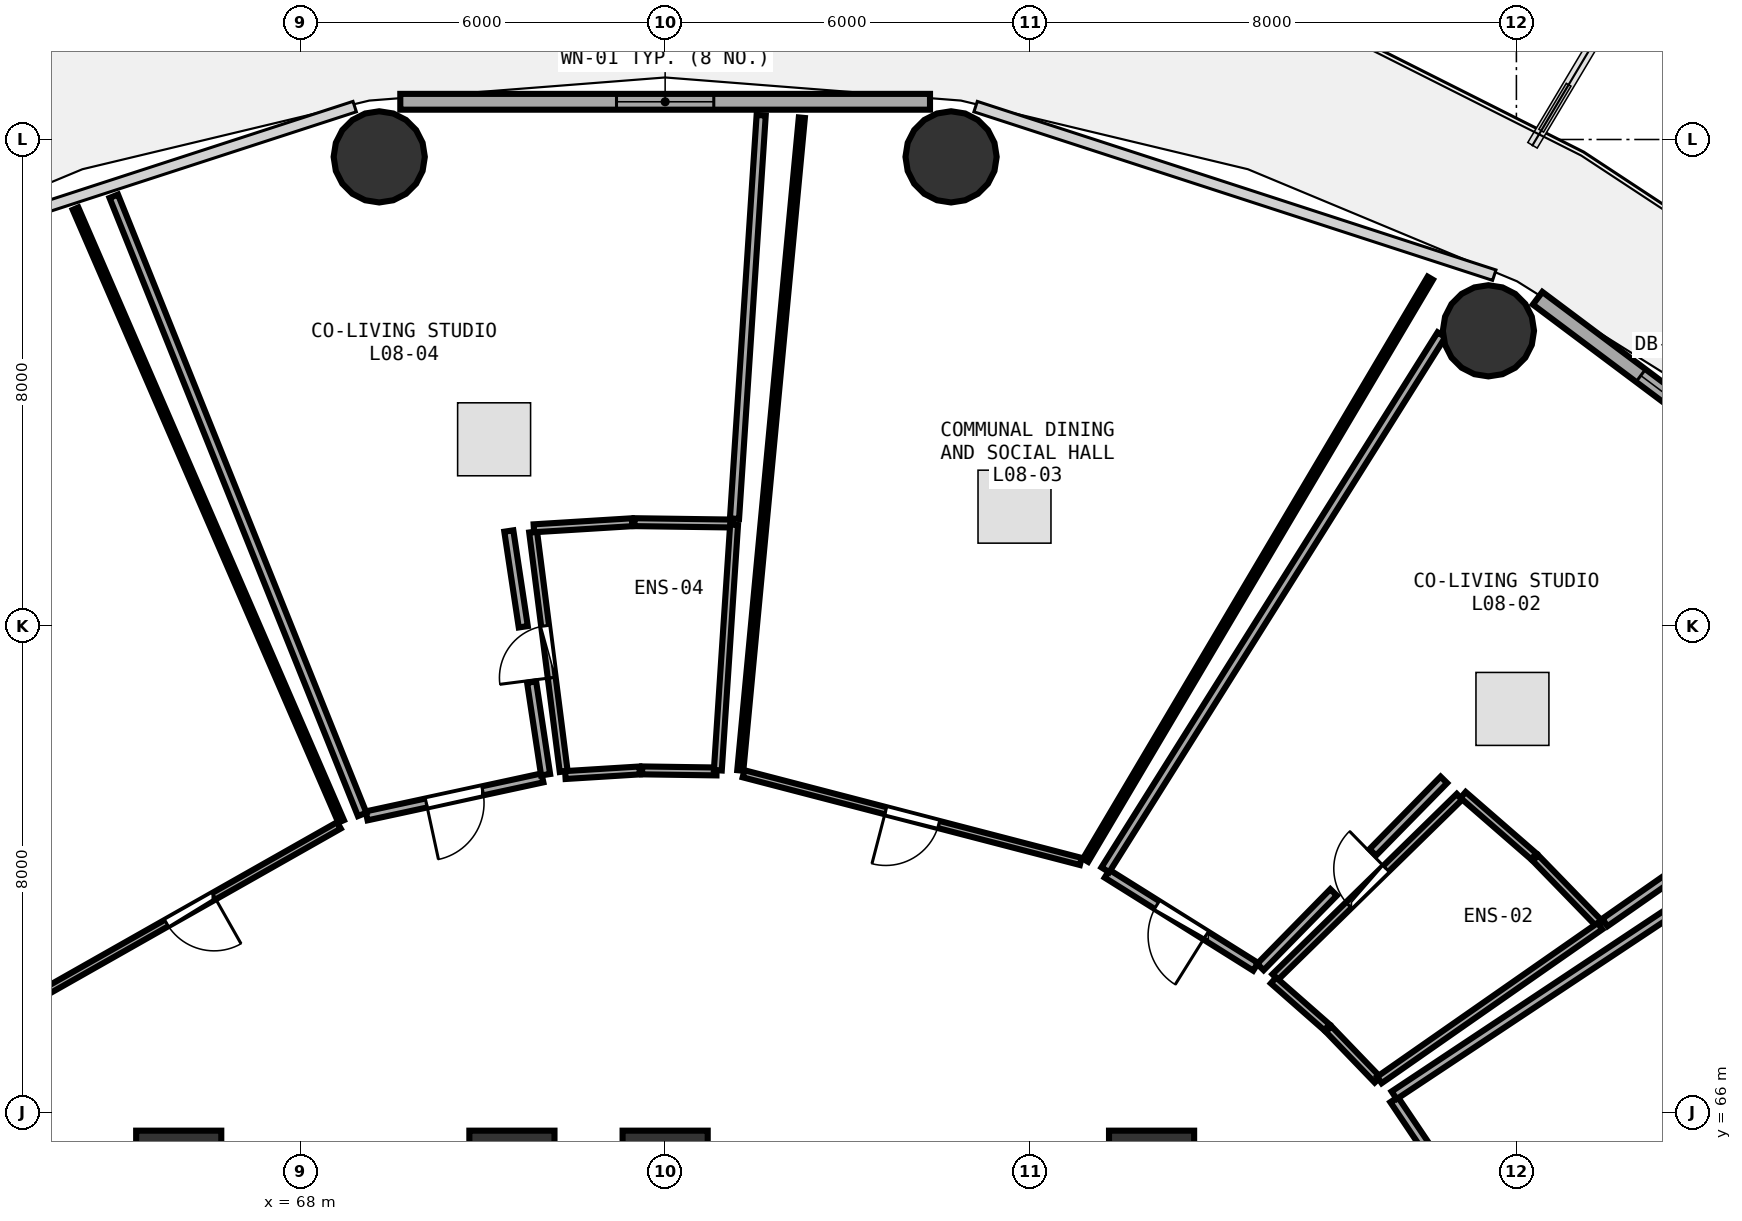
"""IFC4 building model, lengths in metres.
Left out: names, types, materials, properties, quantities, classifications, styles, units other than length and angle.
Written with IfcOpenShell. Run it as: python <this file> out.ifc"""

import sys

from ifc_helpers import new_model, si_unit, direction, frame, frame_2d, origin, origin_2d, place, context, subcontext, project, spatial, rectangle, circle, extrude, element, fill, save


model = new_model("IFC4")
c1 = context("Model", 3, precision=1e-05, world=origin(), true_north=direction((0.0, 1.0)))
c2 = subcontext(c1, "Body", "Model", "MODEL_VIEW")
j1 = project(units=[si_unit("LENGTHUNIT", "METRE"), si_unit("PLANEANGLEUNIT", "RADIAN")], contexts=[c1])
p1 = place(None, origin())
s1 = spatial("IfcSite", under=j1, at=p1, CompositionType="ELEMENT")
p2 = place(p1, origin())
s2 = spatial("IfcBuilding", under=s1, at=p2, CompositionType="ELEMENT")
p3 = place(p2, frame((0.0, 0.0, 33.75)))
s3 = spatial("IfcBuildingStorey", under=s2, at=p3, CompositionType="ELEMENT", Elevation=33.75)
for number, where, z_axis, x_axis in (
    (1, (82.0, 65.0, 0.0), (0.0, 0.0, 1.0), (1.0, 0.0, 0.0)),
    (2, (74.0, 65.0, 0.0), (0.0, 0.0, 1.0), (1.0, 0.0, 0.0)),
    (3, (71.48, 65.0, 0.0), (0.0, 0.0, 1.0), (1.0, 0.0, 0.0)),
    (4, (66.0, 65.0, 0.0), (0.0, 0.0, 1.0), (1.0, 0.0, 0.0)),
):
    element("IfcColumn", number, at=place(p3, frame(where, z_axis=z_axis, x_axis=x_axis)), inside=s3, PredefinedType="PILASTER", context=c2, shape_type="SweptSolid", body=[
        extrude(rectangle(XDim=1.4, YDim=1.4, at=origin_2d()), origin(), (0.0, 0.0, 1.0), 3.75),
    ])
for number, where, z_axis, x_axis in (
    (5, (87.54, 78.854, 0.0), (0.0, 0.0, 1.0), (1.0, 0.0, 0.0)),
    (6, (78.702, 81.714, 0.0), (0.0, 0.0, 1.0), (1.0, 0.0, 0.0)),
    (7, (69.298, 81.714, 0.0), (0.0, 0.0, 1.0), (1.0, 0.0, 0.0)),
):
    element("IfcColumn", number, at=place(p3, frame(where, z_axis=z_axis, x_axis=x_axis)), inside=s3, PredefinedType="COLUMN", context=c2, shape_type="SweptSolid", body=[
        extrude(circle(Radius=0.75, at=origin_2d()), origin(), (0.0, 0.0, 1.0), 3.75),
    ])
p4 = place(p3, frame((94.984, 74.418, 0.0), z_axis=(0.0, 0.0, 1.0), x_axis=(-0.80030733173, 0.599590005569, 0.0)))
e8 = element("IfcWall", 8, at=p4, inside=s3, PredefinedType="SOLIDWALL", context=c2, shape_type="SweptSolid", body=[
    extrude(rectangle(XDim=8.291, YDim=0.26, at=frame_2d((4.145, 0.0))), origin(), (0.0, 0.0, 1.0), 3.475),
])
p5 = place(p4, frame((3.67, 0.0, 0.0)))
e9 = element("IfcOpeningElement", 9, at=p5, cuts=e8, PredefinedType="OPENING", context=c2, shape_type="SweptSolid", body=[
    extrude(rectangle(XDim=0.95, YDim=2.1, at=frame_2d((0.475, 1.05))), frame((0.0, 0.14, 0.0), z_axis=(0.0, -1.0, 0.0), x_axis=(1.0, 0.0, 0.0)), (0.0, 0.0, 1.0), 0.28),
])
p6 = place(p4, frame((4.97, 0.0, 0.85)))
e10 = element("IfcOpeningElement", 10, at=p6, cuts=e8, PredefinedType="OPENING", context=c2, shape_type="SweptSolid", body=[
    extrude(rectangle(XDim=1.2, YDim=1.45, at=frame_2d((0.6, 0.725))), frame((0.0, 0.14, 0.0), z_axis=(0.0, -1.0, 0.0), x_axis=(1.0, 0.0, 0.0)), (0.0, 0.0, 1.0), 0.28),
])
p7 = place(p3, frame((78.356, 82.62, 0.0), z_axis=(0.0, 0.0, 1.0), x_axis=(-1.0, 0.0, 0.0)))
e11 = element("IfcWall", 11, at=p7, inside=s3, PredefinedType="SOLIDWALL", context=c2, shape_type="SweptSolid", body=[
    extrude(rectangle(XDim=8.712, YDim=0.26, at=frame_2d((4.356, 0.0))), origin(), (0.0, 0.0, 1.0), 3.475),
])
p8 = place(p7, frame((3.556, 0.0, 0.85)))
e12 = element("IfcOpeningElement", 12, at=p8, cuts=e11, PredefinedType="OPENING", context=c2, shape_type="SweptSolid", body=[
    extrude(rectangle(XDim=1.6, YDim=1.45, at=frame_2d((0.8, 0.725))), frame((0.0, 0.14, 0.0), z_axis=(0.0, -1.0, 0.0), x_axis=(1.0, 0.0, 0.0)), (0.0, 0.0, 1.0), 0.28),
])
p9 = place(p3, frame((87.533, 63.917, 0.0), z_axis=(0.0, 0.0, 1.0), x_axis=(-0.558444152287, 0.829542119953, 0.0)))
e13 = element("IfcWall", 13, at=p9, inside=s3, PredefinedType="PARTITIONING", context=c2, shape_type="SweptSolid", body=[
    extrude(rectangle(XDim=2.765, YDim=0.15, at=frame_2d((1.382, 0.0))), origin(), (0.0, 0.0, 1.0), 2.875),
])
p10 = place(p9, frame((0.907, 0.0, 0.0)))
e14 = element("IfcOpeningElement", 14, at=p10, cuts=e13, PredefinedType="OPENING", context=c2, shape_type="SweptSolid", body=[
    extrude(rectangle(XDim=0.95, YDim=2.08, at=frame_2d((0.475, 1.04))), frame((0.0, 0.085, 0.0), z_axis=(0.0, -1.0, 0.0), x_axis=(1.0, 0.0, 0.0)), (0.0, 0.0, 1.0), 0.17),
])
p11 = place(p3, frame((84.033, 68.226, 0.0), z_axis=(0.0, 0.0, 1.0), x_axis=(0.714891568972, 0.699235328493, 0.0)))
e15 = element("IfcWall", 15, at=p11, inside=s3, PredefinedType="PLUMBINGWALL", context=c2, shape_type="SweptSolid", body=[
    extrude(rectangle(XDim=4.241, YDim=0.13, at=frame_2d((2.121, 0.0))), origin(), (0.0, 0.0, 1.0), 3.235),
])
p12 = place(p11, frame((1.691, 0.0, 0.0)))
e16 = element("IfcOpeningElement", 16, at=p12, cuts=e15, PredefinedType="OPENING", context=c2, shape_type="SweptSolid", body=[
    extrude(rectangle(XDim=0.86, YDim=2.05, at=frame_2d((0.43, 1.025))), frame((0.0, 0.075, 0.0), z_axis=(0.0, -1.0, 0.0), x_axis=(1.0, 0.0, 0.0)), (0.0, 0.0, 1.0), 0.15),
])
p13 = place(p3, frame((83.711, 68.395, 0.0), z_axis=(0.0, 0.0, 1.0), x_axis=(-0.847522016495, 0.530760239238, 0.0)))
e17 = element("IfcWall", 17, at=p13, inside=s3, PredefinedType="PARTITIONING", context=c2, shape_type="SweptSolid", body=[
    extrude(rectangle(XDim=2.882, YDim=0.15, at=frame_2d((1.441, 0.0))), origin(), (0.0, 0.0, 1.0), 2.875),
])
p14 = place(p13, frame((0.966, 0.0, 0.0)))
e18 = element("IfcOpeningElement", 18, at=p14, cuts=e17, PredefinedType="OPENING", context=c2, shape_type="SweptSolid", body=[
    extrude(rectangle(XDim=0.95, YDim=2.08, at=frame_2d((0.475, 1.04))), frame((0.0, 0.085, 0.0), z_axis=(0.0, -1.0, 0.0), x_axis=(1.0, 0.0, 0.0)), (0.0, 0.0, 1.0), 0.17),
])
p15 = place(p3, frame((80.836, 70.127, 0.0), z_axis=(0.0, 0.0, 1.0), x_axis=(-0.967834541954, 0.251587558119, 0.0)))
e19 = element("IfcWall", 19, at=p15, inside=s3, PredefinedType="PARTITIONING", context=c2, shape_type="SweptSolid", body=[
    extrude(rectangle(XDim=5.73, YDim=0.12, at=frame_2d((2.865, 0.0))), origin(), (0.0, 0.0, 1.0), 2.875),
])
p16 = place(p15, frame((2.415, 0.0, 0.0)))
e20 = element("IfcOpeningElement", 20, at=p16, cuts=e19, PredefinedType="OPENING", context=c2, shape_type="SweptSolid", body=[
    extrude(rectangle(XDim=0.9, YDim=2.08, at=frame_2d((0.45, 1.04))), frame((0.0, 0.07, 0.0), z_axis=(0.0, -1.0, 0.0), x_axis=(1.0, 0.0, 0.0)), (0.0, 0.0, 1.0), 0.14),
])
p17 = place(p3, frame((72.331, 71.606, 0.0), z_axis=(0.0, 0.0, 1.0), x_axis=(-0.126591984802, 0.991954872655, 0.0)))
e21 = element("IfcWall", 21, at=p17, inside=s3, PredefinedType="PLUMBINGWALL", context=c2, shape_type="SweptSolid", body=[
    extrude(rectangle(XDim=3.971, YDim=0.13, at=frame_2d((1.985, 0.0))), origin(), (0.0, 0.0, 1.0), 3.175),
])
p18 = place(p17, frame((1.555, 0.0, 0.0)))
e22 = element("IfcOpeningElement", 22, at=p18, cuts=e21, PredefinedType="OPENING", context=c2, shape_type="SweptSolid", body=[
    extrude(rectangle(XDim=0.86, YDim=2.05, at=frame_2d((0.43, 1.025))), frame((0.0, 0.075, 0.0), z_axis=(0.0, -1.0, 0.0), x_axis=(1.0, 0.0, 0.0)), (0.0, 0.0, 1.0), 0.15),
])
p19 = place(p3, frame((71.981, 71.501, 0.0), z_axis=(0.0, 0.0, 1.0), x_axis=(-0.977451938751, -0.211158015313, 0.0)))
e23 = element("IfcWall", 23, at=p19, inside=s3, PredefinedType="PARTITIONING", context=c2, shape_type="SweptSolid", body=[
    extrude(rectangle(XDim=2.958, YDim=0.15, at=frame_2d((1.479, 0.0))), origin(), (0.0, 0.0, 1.0), 2.875),
])
p20 = place(p19, frame((1.004, 0.0, 0.0)))
e24 = element("IfcOpeningElement", 24, at=p20, cuts=e23, PredefinedType="OPENING", context=c2, shape_type="SweptSolid", body=[
    extrude(rectangle(XDim=0.95, YDim=2.08, at=frame_2d((0.475, 1.04))), frame((0.0, 0.085, 0.0), z_axis=(0.0, -1.0, 0.0), x_axis=(1.0, 0.0, 0.0)), (0.0, 0.0, 1.0), 0.17),
])
p21 = place(p3, frame((68.635, 70.72, 0.0), z_axis=(0.0, 0.0, 1.0), x_axis=(-0.870068136537, -0.49293147372, 0.0)))
e25 = element("IfcWall", 25, at=p21, inside=s3, PredefinedType="PARTITIONING", context=c2, shape_type="SweptSolid", body=[
    extrude(rectangle(XDim=5.621, YDim=0.12, at=frame_2d((2.811, 0.0))), origin(), (0.0, 0.0, 1.0), 2.875),
])
p22 = place(p21, frame((2.36, 0.0, 0.0)))
e26 = element("IfcOpeningElement", 26, at=p22, cuts=e25, PredefinedType="OPENING", context=c2, shape_type="SweptSolid", body=[
    extrude(rectangle(XDim=0.9, YDim=2.08, at=frame_2d((0.45, 1.04))), frame((0.0, 0.07, 0.0), z_axis=(0.0, -1.0, 0.0), x_axis=(1.0, 0.0, 0.0)), (0.0, 0.0, 1.0), 0.14),
])
p23 = place(p3, frame((85.989, 66.282, 0.0), z_axis=(0.0, 0.0, 1.0), x_axis=(0.833114362659, 0.553100767248, 0.0)))
e27 = element("IfcWall", 27, at=p23, inside=s3, PredefinedType="PARTITIONING", context=c2, shape_type="SweptSolid", body=[
    extrude(rectangle(XDim=11.808, YDim=0.15, at=frame_2d((5.904, 0.0))), origin(), (0.0, 0.0, 1.0), 2.875),
])
p24 = place(p3, frame((91.8, 65.626, 0.0), z_axis=(0.0, 0.0, 1.0), x_axis=(-0.92347379334, -0.383661508383, 0.0)))
e28 = element("IfcWall", 28, at=p24, inside=s3, PredefinedType="PARTITIONING", context=c2, shape_type="SweptSolid", body=[
    extrude(rectangle(XDim=1.8, YDim=0.15, at=frame_2d((0.9, 0.0))), origin(), (0.0, 0.0, 1.0), 2.875),
])
p25 = place(p3, frame((85.716, 66.536, 0.0), z_axis=(0.0, 0.0, 1.0), x_axis=(-0.693609314424, 0.720351385745, 0.0)))
e29 = element("IfcWall", 29, at=p25, inside=s3, PredefinedType="PLUMBINGWALL", context=c2, shape_type="SweptSolid", body=[
    extrude(rectangle(XDim=1.159, YDim=0.13, at=frame_2d((0.58, 0.0))), origin(), (0.0, 0.0, 1.0), 2.875),
])
p26 = place(p3, frame((84.883, 67.399, 0.0), z_axis=(0.0, 0.0, 1.0), x_axis=(-0.75116489845, 0.660114607729, 0.0)))
e30 = element("IfcWall", 30, at=p26, inside=s3, PredefinedType="PLUMBINGWALL", context=c2, shape_type="SweptSolid", body=[
    extrude(rectangle(XDim=1.169, YDim=0.13, at=frame_2d((0.584, 0.0))), origin(), (0.0, 0.0, 1.0), 3.48),
])
p27 = place(p3, frame((87.123, 71.221, 0.0), z_axis=(0.0, 0.0, 1.0), x_axis=(0.754783045921, -0.655974506814, 0.0)))
e31 = element("IfcWall", 31, at=p27, inside=s3, PredefinedType="PLUMBINGWALL", context=c2, shape_type="SweptSolid", body=[
    extrude(rectangle(XDim=1.539, YDim=0.13, at=frame_2d((0.77, 0.0))), origin(), (0.0, 0.0, 1.0), 3.48),
])
p28 = place(p3, frame((88.314, 70.184, 0.0), z_axis=(0.0, 0.0, 1.0), x_axis=(0.696872710474, -0.717194830849, 0.0)))
e32 = element("IfcWall", 32, at=p28, inside=s3, PredefinedType="PLUMBINGWALL", context=c2, shape_type="SweptSolid", body=[
    extrude(rectangle(XDim=1.526, YDim=0.13, at=frame_2d((0.763, 0.0))), origin(), (0.0, 0.0, 1.0), 2.875),
])
p29 = place(p3, frame((89.375, 69.064, 0.0), z_axis=(0.0, 0.0, 1.0), x_axis=(-0.820234155097, -0.572027910869, 0.0)))
e33 = element("IfcWall", 33, at=p29, inside=s3, PredefinedType="PLUMBINGWALL", context=c2, shape_type="SweptSolid", body=[
    extrude(rectangle(XDim=4.423, YDim=0.13, at=frame_2d((2.212, 0.0))), origin(), (0.0, 0.0, 1.0), 3.235),
])
p30 = place(p3, frame((81.239, 69.99, 0.0), z_axis=(0.0, 0.0, 1.0), x_axis=(0.531976191107, 0.846759311785, 0.0)))
e34 = element("IfcWall", 34, at=p30, inside=s3, PredefinedType="PARTITIONING", context=c2, shape_type="SweptSolid", body=[
    extrude(rectangle(XDim=10.392, YDim=0.15, at=frame_2d((5.196, 0.0))), origin(), (0.0, 0.0, 1.0), 3.175),
])
p31 = place(p3, frame((94.602, 72.717, 0.0), z_axis=(0.0, 0.0, 1.0), x_axis=(-0.819914684215, -0.572485729611, 0.0)))
e35 = element("IfcWall", 35, at=p31, inside=s3, PredefinedType="PARTITIONING", context=c2, shape_type="SweptSolid", body=[
    extrude(rectangle(XDim=6.277, YDim=0.15, at=frame_2d((3.139, 0.0))), origin(), (0.0, 0.0, 1.0), 3.175),
])
p32 = place(p3, frame((86.807, 71.469, 0.0), z_axis=(0.0, 0.0, 1.0), x_axis=(-0.699982262545, -0.714160228606, 0.0)))
e36 = element("IfcWall", 36, at=p32, inside=s3, PredefinedType="PARTITIONING", context=c2, shape_type="SweptSolid", body=[
    extrude(rectangle(XDim=1.67, YDim=0.15, at=frame_2d((0.835, 0.0))), origin(), (0.0, 0.0, 1.0), 3.48),
])
p33 = place(p3, frame((84.993, 69.619, 0.0), z_axis=(0.0, 0.0, 1.0), x_axis=(-0.69997059614, -0.714171663215, 0.0)))
e37 = element("IfcWall", 37, at=p33, inside=s3, PredefinedType="PARTITIONING", context=c2, shape_type="SweptSolid", body=[
    extrude(rectangle(XDim=1.719, YDim=0.15, at=frame_2d((0.86, 0.0))), origin(), (0.0, 0.0, 1.0), 3.235),
])
p34 = place(p3, frame((75.236, 71.624, 0.0), z_axis=(0.0, 0.0, 1.0), x_axis=(0.093901844858, 0.995581460018, 0.0)))
e38 = element("IfcWall", 38, at=p34, inside=s3, PredefinedType="PARTITIONING", context=c2, shape_type="SweptSolid", body=[
    extrude(rectangle(XDim=10.782, YDim=0.1, at=frame_2d((5.391, 0.0))), origin(), (0.0, 0.0, 1.0), 2.875),
])
p35 = place(p3, frame((86.583, 79.719, 0.0), z_axis=(0.0, 0.0, 1.0), x_axis=(-0.509594840762, -0.860414492131, 0.0)))
e39 = element("IfcWall", 39, at=p35, inside=s3, PredefinedType="PARTITIONING", context=c2, shape_type="SweptSolid", body=[
    extrude(rectangle(XDim=11.125, YDim=0.1, at=frame_2d((5.562, 0.0))), origin(), (0.0, 0.0, 1.0), 2.875),
])
p36 = place(p3, frame((74.845, 71.607, 0.0), z_axis=(0.0, 0.0, 1.0), x_axis=(-0.999899717313, 0.014161755422, 0.0)))
e40 = element("IfcWall", 40, at=p36, inside=s3, PredefinedType="PLUMBINGWALL", context=c2, shape_type="SweptSolid", body=[
    extrude(rectangle(XDim=1.224, YDim=0.13, at=frame_2d((0.612, 0.0))), origin(), (0.0, 0.0, 1.0), 3.48),
])
p37 = place(p3, frame((73.581, 71.624, 0.0), z_axis=(0.0, 0.0, 1.0), x_axis=(-0.998088101555, -0.061807293544, 0.0)))
e41 = element("IfcWall", 41, at=p37, inside=s3, PredefinedType="PLUMBINGWALL", context=c2, shape_type="SweptSolid", body=[
    extrude(rectangle(XDim=1.225, YDim=0.13, at=frame_2d((0.612, 0.0))), origin(), (0.0, 0.0, 1.0), 3.48),
])
p38 = place(p3, frame((71.841, 75.606, 0.0), z_axis=(0.0, 0.0, 1.0), x_axis=(0.99810332164, 0.061561021199, 0.0)))
e42 = element("IfcWall", 42, at=p38, inside=s3, PredefinedType="PLUMBINGWALL", context=c2, shape_type="SweptSolid", body=[
    extrude(rectangle(XDim=1.618, YDim=0.13, at=frame_2d((0.809, 0.0))), origin(), (0.0, 0.0, 1.0), 3.48),
])
p39 = place(p3, frame((73.496, 75.707, 0.0), z_axis=(0.0, 0.0, 1.0), x_axis=(0.999903766804, -0.013872891954, 0.0)))
e43 = element("IfcWall", 43, at=p39, inside=s3, PredefinedType="PLUMBINGWALL", context=c2, shape_type="SweptSolid", body=[
    extrude(rectangle(XDim=1.619, YDim=0.13, at=frame_2d((0.81, 0.0))), origin(), (0.0, 0.0, 1.0), 3.48),
])
p40 = place(p3, frame((75.134, 75.664, 0.0), z_axis=(0.0, 0.0, 1.0), x_axis=(-0.066134527356, -0.997810715663, 0.0)))
e44 = element("IfcWall", 44, at=p40, inside=s3, PredefinedType="PLUMBINGWALL", context=c2, shape_type="SweptSolid", body=[
    extrude(rectangle(XDim=4.046, YDim=0.13, at=frame_2d((2.023, 0.0))), origin(), (0.0, 0.0, 1.0), 3.175),
])
p41 = place(p3, frame((69.017, 70.901, 0.0), z_axis=(0.0, 0.0, 1.0), x_axis=(-0.372877076454, 0.927880749803, 0.0)))
e45 = element("IfcWall", 45, at=p41, inside=s3, PredefinedType="PARTITIONING", context=c2, shape_type="SweptSolid", body=[
    extrude(rectangle(XDim=10.956, YDim=0.15, at=frame_2d((5.478, 0.0))), origin(), (0.0, 0.0, 1.0), 2.875),
])
p42 = place(p3, frame((75.579, 82.399, 0.0), z_axis=(0.0, 0.0, 1.0), x_axis=(-0.065975596533, -0.997821236827, 0.0)))
e46 = element("IfcWall", 46, at=p42, inside=s3, PredefinedType="PARTITIONING", context=c2, shape_type="SweptSolid", body=[
    extrude(rectangle(XDim=6.65, YDim=0.15, at=frame_2d((3.325, 0.0))), origin(), (0.0, 0.0, 1.0), 2.875),
])
p43 = place(p3, frame((71.429, 75.561, 0.0), z_axis=(0.0, 0.0, 1.0), x_axis=(0.149314908759, -0.988789693526, 0.0)))
e47 = element("IfcWall", 47, at=p43, inside=s3, PredefinedType="PARTITIONING", context=c2, shape_type="SweptSolid", body=[
    extrude(rectangle(XDim=1.593, YDim=0.15, at=frame_2d((0.796, 0.0))), origin(), (0.0, 0.0, 1.0), 3.175),
])
p44 = place(p3, frame((71.804, 73.077, 0.0), z_axis=(0.0, 0.0, 1.0), x_axis=(0.149162041114, -0.988812765639, 0.0)))
e48 = element("IfcWall", 48, at=p44, inside=s3, PredefinedType="PARTITIONING", context=c2, shape_type="SweptSolid", body=[
    extrude(rectangle(XDim=1.54, YDim=0.15, at=frame_2d((0.77, 0.0))), origin(), (0.0, 0.0, 1.0), 3.48),
])
p45 = place(p3, frame((64.303, 80.863, 0.0), z_axis=(0.0, 0.0, 1.0), x_axis=(0.397730954589, -0.917502091421, 0.0)))
e49 = element("IfcWall", 49, at=p45, inside=s3, PredefinedType="PARTITIONING", context=c2, shape_type="SweptSolid", body=[
    extrude(rectangle(XDim=10.983, YDim=0.1, at=frame_2d((5.491, 0.0))), origin(), (0.0, 0.0, 1.0), 2.875),
])
p46 = place(p6, origin())
e50 = element("IfcWindow", 50, at=p46, inside=s3, PartitioningType="SINGLE_PANEL", PredefinedType="WINDOW", context=c2, shape_type="SweptSolid", body=[
    extrude(rectangle(XDim=1.2, YDim=1.45, at=frame_2d((0.6, 0.725))), frame((0.0, 0.03, 0.0), z_axis=(0.0, -1.0, 0.0), x_axis=(1.0, 0.0, 0.0)), (0.0, 0.0, 1.0), 0.06),
])
fill(e10, e50)
p47 = place(p8, origin())
e51 = element("IfcWindow", 51, at=p47, inside=s3, PartitioningType="SINGLE_PANEL", PredefinedType="WINDOW", context=c2, shape_type="SweptSolid", body=[
    extrude(rectangle(XDim=1.6, YDim=1.45, at=frame_2d((0.8, 0.725))), frame((0.0, 0.03, 0.0), z_axis=(0.0, -1.0, 0.0), x_axis=(1.0, 0.0, 0.0)), (0.0, 0.0, 1.0), 0.06),
])
fill(e12, e51)
p48 = place(p12, origin())
e52 = element("IfcDoor", 52, at=p48, inside=s3, OperationType="SINGLE_SWING_RIGHT", PredefinedType="DOOR", context=c2, shape_type="SweptSolid", body=[
    extrude(rectangle(XDim=0.86, YDim=2.05, at=frame_2d((0.43, 1.025))), frame((0.0, 0.025, 0.0), z_axis=(0.0, -1.0, 0.0), x_axis=(1.0, 0.0, 0.0)), (0.0, 0.0, 1.0), 0.05),
])
fill(e16, e52)
p49 = place(p14, origin())
e53 = element("IfcDoor", 53, at=p49, inside=s3, OperationType="SINGLE_SWING_LEFT", PredefinedType="DOOR", context=c2, shape_type="SweptSolid", body=[
    extrude(rectangle(XDim=0.95, YDim=2.08, at=frame_2d((0.475, 1.04))), frame((0.0, 0.025, 0.0), z_axis=(0.0, -1.0, 0.0), x_axis=(1.0, 0.0, 0.0)), (0.0, 0.0, 1.0), 0.05),
])
fill(e18, e53)
p50 = place(p16, origin())
e54 = element("IfcDoor", 54, at=p50, inside=s3, OperationType="SINGLE_SWING_RIGHT", PredefinedType="DOOR", context=c2, shape_type="SweptSolid", body=[
    extrude(rectangle(XDim=0.9, YDim=2.08, at=frame_2d((0.45, 1.04))), frame((0.0, 0.025, 0.0), z_axis=(0.0, -1.0, 0.0), x_axis=(1.0, 0.0, 0.0)), (0.0, 0.0, 1.0), 0.05),
])
fill(e20, e54)
p51 = place(p18, origin())
e55 = element("IfcDoor", 55, at=p51, inside=s3, OperationType="SINGLE_SWING_LEFT", PredefinedType="DOOR", context=c2, shape_type="SweptSolid", body=[
    extrude(rectangle(XDim=0.86, YDim=2.05, at=frame_2d((0.43, 1.025))), frame((0.0, 0.025, 0.0), z_axis=(0.0, -1.0, 0.0), x_axis=(1.0, 0.0, 0.0)), (0.0, 0.0, 1.0), 0.05),
])
fill(e22, e55)
p52 = place(p20, origin())
e56 = element("IfcDoor", 56, at=p52, inside=s3, OperationType="SINGLE_SWING_RIGHT", PredefinedType="DOOR", context=c2, shape_type="SweptSolid", body=[
    extrude(rectangle(XDim=0.95, YDim=2.08, at=frame_2d((0.475, 1.04))), frame((0.0, 0.025, 0.0), z_axis=(0.0, -1.0, 0.0), x_axis=(1.0, 0.0, 0.0)), (0.0, 0.0, 1.0), 0.05),
])
fill(e24, e56)
p53 = place(p22, origin())
e57 = element("IfcDoor", 57, at=p53, inside=s3, OperationType="SINGLE_SWING_LEFT", PredefinedType="DOOR", context=c2, shape_type="SweptSolid", body=[
    extrude(rectangle(XDim=0.9, YDim=2.08, at=frame_2d((0.45, 1.04))), frame((0.0, 0.025, 0.0), z_axis=(0.0, -1.0, 0.0), x_axis=(1.0, 0.0, 0.0)), (0.0, 0.0, 1.0), 0.05),
])
fill(e26, e57)
save(model, sys.argv[1])
